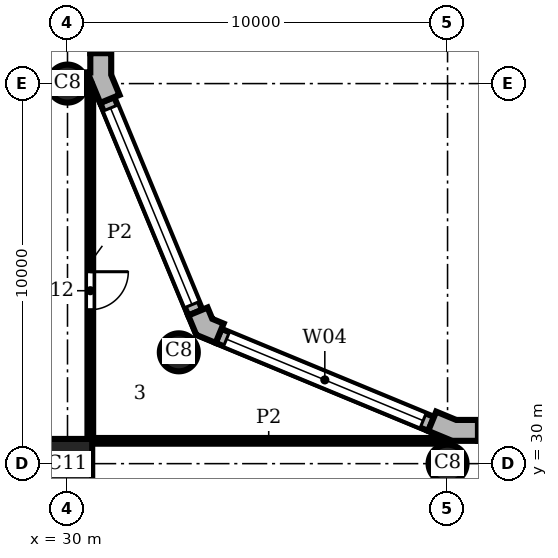
"""IFC4 building model, lengths in metres.
Left out: names, types, materials, properties, quantities, classifications, styles, units other than length and angle.
Written with IfcOpenShell. Run it as: python <this file> out.ifc"""

import sys

from ifc_helpers import new_model, si_unit, direction, frame, frame_2d, origin, origin_2d, place, context, subcontext, project, spatial, polyline, rectangle, circle, outline, extrude, element, fill, save


model = new_model("IFC4")
c1 = context("Model", 3, precision=1e-05, world=origin(), true_north=direction((0.0, 1.0)))
c2 = subcontext(c1, "Body", "Model", "MODEL_VIEW")
j1 = project(units=[si_unit("LENGTHUNIT", "METRE"), si_unit("PLANEANGLEUNIT", "RADIAN")], contexts=[c1])
p1 = place(None, origin())
s1 = spatial("IfcSite", under=j1, at=p1, CompositionType="ELEMENT")
p2 = place(p1, origin())
s2 = spatial("IfcBuilding", under=s1, at=p2, CompositionType="ELEMENT")
p3 = place(p2, frame((0.0, 0.0, 225.3)))
s3 = spatial("IfcBuildingStorey", under=s2, at=p3, CompositionType="ELEMENT", Elevation=225.3)
for number, where, z_axis, x_axis in (
    (1, (40.0, 30.0, 0.0), (0.0, 0.0, 1.0), (1.0, 0.0, 0.0)),
    (2, (32.929, 32.929, 0.0), (0.0, 0.0, 1.0), (1.0, 0.0, 0.0)),
    (3, (30.0, 40.0, 0.0), (0.0, 0.0, 1.0), (1.0, 0.0, 0.0)),
):
    element("IfcColumn", number, at=place(p3, frame(where, z_axis=z_axis, x_axis=x_axis)), inside=s3, PredefinedType="COLUMN", context=c2, shape_type="SweptSolid", body=[
        extrude(circle(Radius=0.5, at=origin_2d()), origin(), (0.0, 0.0, 1.0), 3.9),
    ])
p4 = place(p3, frame((30.0, 30.0, 0.0), z_axis=(0.0, 0.0, 1.0), x_axis=(1.0, 0.0, 0.0)))
e4 = element("IfcColumn", 4, at=p4, inside=s3, PredefinedType="COLUMN", context=c2, shape_type="SweptSolid", body=[
    extrude(rectangle(XDim=1.3, YDim=1.3, at=origin_2d()), origin(), (0.0, 0.0, 1.0), 3.9),
])
p5 = place(p3, origin())
e5 = element("IfcWall", 5, at=p5, inside=s3, PredefinedType="SOLIDWALL", context=c2, shape_type="SweptSolid", body=[
    extrude(outline(polyline([(40.8, 31.0), (40.8, 31.15), (40.229, 31.15), (39.701, 31.369), (39.644, 31.23), (39.49, 30.861), (40.119, 30.6), (40.8, 30.6), (40.8, 31.0)])), origin(), (0.0, 0.0, 1.0), 3.9),
])
e6 = element("IfcWall", 6, at=p5, inside=s3, PredefinedType="SOLIDWALL", context=c2, shape_type="SweptSolid", body=[
    extrude(outline(polyline([(34.051, 33.547), (34.108, 33.685), (33.809, 33.809), (33.685, 34.108), (33.547, 34.051), (33.177, 33.898), (33.388, 33.388), (33.898, 33.177), (34.051, 33.547)])), origin(), (0.0, 0.0, 1.0), 3.9),
])
e7 = element("IfcWall", 7, at=p5, inside=s3, PredefinedType="SOLIDWALL", context=c2, shape_type="SweptSolid", body=[
    extrude(outline(polyline([(30.62, 39.995), (30.62, 40.071), (30.861, 39.49), (31.23, 39.644), (31.369, 39.701), (31.15, 40.229), (31.15, 40.8), (31.0, 40.8), (30.6, 40.8), (30.6, 40.295), (30.5, 40.295), (30.5, 39.995), (30.62, 39.995)])), origin(), (0.0, 0.0, 1.0), 3.9),
])
p6 = place(p3, frame((59.2, 30.8, 0.0), z_axis=(0.0, 0.0, 1.0), x_axis=(-1.0, 0.0, 0.0)))
e8 = element("IfcWall", 8, at=p6, inside=s3, PredefinedType="SOLIDWALL", context=c2, shape_type="SweptSolid", body=[
    extrude(rectangle(XDim=18.4, YDim=0.4, at=frame_2d((9.2, 0.0))), origin(), (0.0, 0.0, 1.0), 3.9),
])
p7 = place(p6, frame((0.2, 0.0, 0.9)))
e9 = element("IfcOpeningElement", 9, at=p7, cuts=e8, PredefinedType="OPENING", context=c2, shape_type="SweptSolid", body=[
    extrude(rectangle(XDim=8.0, YDim=2.35, at=frame_2d((4.0, 1.175))), frame((0.0, 0.21, 0.0), z_axis=(0.0, -1.0, 0.0), x_axis=(1.0, 0.0, 0.0)), (0.0, 0.0, 1.0), 0.42),
])
p8 = place(p6, frame((10.2, 0.0, 0.9)))
e10 = element("IfcOpeningElement", 10, at=p8, cuts=e8, PredefinedType="OPENING", context=c2, shape_type="SweptSolid", body=[
    extrude(rectangle(XDim=8.0, YDim=2.35, at=frame_2d((4.0, 1.175))), frame((0.0, 0.21, 0.0), z_axis=(0.0, -1.0, 0.0), x_axis=(1.0, 0.0, 0.0)), (0.0, 0.0, 1.0), 0.42),
])
p9 = place(p3, frame((39.567, 31.045, 0.0), z_axis=(0.0, 0.0, 1.0), x_axis=(-0.923891000409, 0.382655745237, 0.0)))
e11 = element("IfcWall", 11, at=p9, inside=s3, PredefinedType="SOLIDWALL", context=c2, shape_type="SweptSolid", body=[
    extrude(rectangle(XDim=6.053, YDim=0.4, at=frame_2d((3.027, 0.0))), origin(), (0.0, 0.0, 1.0), 3.9),
])
p10 = place(p9, frame((0.227, 0.0, 0.9)))
e12 = element("IfcOpeningElement", 12, at=p10, cuts=e11, PredefinedType="OPENING", context=c2, shape_type="SweptSolid", body=[
    extrude(rectangle(XDim=5.6, YDim=2.35, at=frame_2d((2.8, 1.175))), frame((0.0, 0.21, 0.0), z_axis=(0.0, -1.0, 0.0), x_axis=(1.0, 0.0, 0.0)), (0.0, 0.0, 1.0), 0.42),
])
p11 = place(p3, frame((33.362, 33.974, 0.0), z_axis=(0.0, 0.0, 1.0), x_axis=(-0.382655745237, 0.923891000409, 0.0)))
e13 = element("IfcWall", 13, at=p11, inside=s3, PredefinedType="SOLIDWALL", context=c2, shape_type="SweptSolid", body=[
    extrude(rectangle(XDim=6.053, YDim=0.4, at=frame_2d((3.027, 0.0))), origin(), (0.0, 0.0, 1.0), 3.9),
])
p12 = place(p11, frame((0.227, 0.0, 0.9)))
e14 = element("IfcOpeningElement", 14, at=p12, cuts=e13, PredefinedType="OPENING", context=c2, shape_type="SweptSolid", body=[
    extrude(rectangle(XDim=5.6, YDim=2.35, at=frame_2d((2.8, 1.175))), frame((0.0, 0.21, 0.0), z_axis=(0.0, -1.0, 0.0), x_axis=(1.0, 0.0, 0.0)), (0.0, 0.0, 1.0), 0.42),
])
p13 = place(p3, frame((30.8, 40.8, 0.0), z_axis=(0.0, 0.0, 1.0), x_axis=(0.0, 1.0, 0.0)))
e15 = element("IfcWall", 15, at=p13, inside=s3, PredefinedType="SOLIDWALL", context=c2, shape_type="SweptSolid", body=[
    extrude(rectangle(XDim=18.4, YDim=0.4, at=frame_2d((9.2, 0.0))), origin(), (0.0, 0.0, 1.0), 3.9),
])
p14 = place(p13, frame((0.2, 0.0, 0.9)))
e16 = element("IfcOpeningElement", 16, at=p14, cuts=e15, PredefinedType="OPENING", context=c2, shape_type="SweptSolid", body=[
    extrude(rectangle(XDim=8.0, YDim=2.35, at=frame_2d((4.0, 1.175))), frame((0.0, 0.21, 0.0), z_axis=(0.0, -1.0, 0.0), x_axis=(1.0, 0.0, 0.0)), (0.0, 0.0, 1.0), 0.42),
])
p15 = place(p13, frame((10.2, 0.0, 0.9)))
e17 = element("IfcOpeningElement", 17, at=p15, cuts=e15, PredefinedType="OPENING", context=c2, shape_type="SweptSolid", body=[
    extrude(rectangle(XDim=8.0, YDim=2.35, at=frame_2d((4.0, 1.175))), frame((0.0, 0.21, 0.0), z_axis=(0.0, -1.0, 0.0), x_axis=(1.0, 0.0, 0.0)), (0.0, 0.0, 1.0), 0.42),
])
p16 = place(p3, frame((30.6, 30.65, 0.0), z_axis=(0.0, 0.0, 1.0), x_axis=(0.0, 1.0, 0.0)))
e18 = element("IfcWall", 18, at=p16, inside=s3, PredefinedType="PARTITIONING", context=c2, shape_type="SweptSolid", body=[
    extrude(rectangle(XDim=9.288, YDim=0.15, at=frame_2d((4.644, 0.0))), origin(), (0.0, 0.0, 1.0), 3.58),
])
p17 = place(p16, frame((3.4, 0.0, 0.0)))
e19 = element("IfcOpeningElement", 19, at=p17, cuts=e18, PredefinedType="OPENING", context=c2, shape_type="SweptSolid", body=[
    extrude(rectangle(XDim=1.0, YDim=2.1, at=frame_2d((0.5, 1.05))), frame((0.0, 0.085, 0.0), z_axis=(0.0, -1.0, 0.0), x_axis=(1.0, 0.0, 0.0)), (0.0, 0.0, 1.0), 0.17),
])
p18 = place(p3, frame((30.65, 30.6, 0.0), z_axis=(0.0, 0.0, 1.0), x_axis=(1.0, 0.0, 0.0)))
e20 = element("IfcWall", 20, at=p18, inside=s3, PredefinedType="PARTITIONING", context=c2, shape_type="SweptSolid", body=[
    extrude(rectangle(XDim=9.288, YDim=0.15, at=frame_2d((4.644, 0.0))), origin(), (0.0, 0.0, 1.0), 3.58),
])
p19 = place(p10, origin())
e21 = element("IfcWindow", 21, at=p19, inside=s3, PartitioningType="SINGLE_PANEL", PredefinedType="WINDOW", context=c2, shape_type="SweptSolid", body=[
    extrude(rectangle(XDim=5.6, YDim=2.35, at=frame_2d((2.8, 1.175))), frame((0.0, 0.16, 0.0), z_axis=(0.0, -1.0, 0.0), x_axis=(1.0, 0.0, 0.0)), (0.0, 0.0, 1.0), 0.06),
])
fill(e12, e21)
p20 = place(p12, origin())
e22 = element("IfcWindow", 22, at=p20, inside=s3, PartitioningType="SINGLE_PANEL", PredefinedType="WINDOW", context=c2, shape_type="SweptSolid", body=[
    extrude(rectangle(XDim=5.6, YDim=2.35, at=frame_2d((2.8, 1.175))), frame((0.0, 0.16, 0.0), z_axis=(0.0, -1.0, 0.0), x_axis=(1.0, 0.0, 0.0)), (0.0, 0.0, 1.0), 0.06),
])
fill(e14, e22)
p21 = place(p17, frame((1.0, 0.0, 0.0), z_axis=(0.0, 0.0, 1.0), x_axis=(-1.0, 0.0, 0.0)))
e23 = element("IfcDoor", 23, at=p21, inside=s3, OperationType="SINGLE_SWING_LEFT", PredefinedType="DOOR", context=c2, shape_type="SweptSolid", body=[
    extrude(rectangle(XDim=1.0, YDim=2.1, at=frame_2d((0.5, 1.05))), frame((0.0, 0.025, 0.0), z_axis=(0.0, -1.0, 0.0), x_axis=(1.0, 0.0, 0.0)), (0.0, 0.0, 1.0), 0.05),
])
fill(e19, e23)
save(model, sys.argv[1])
